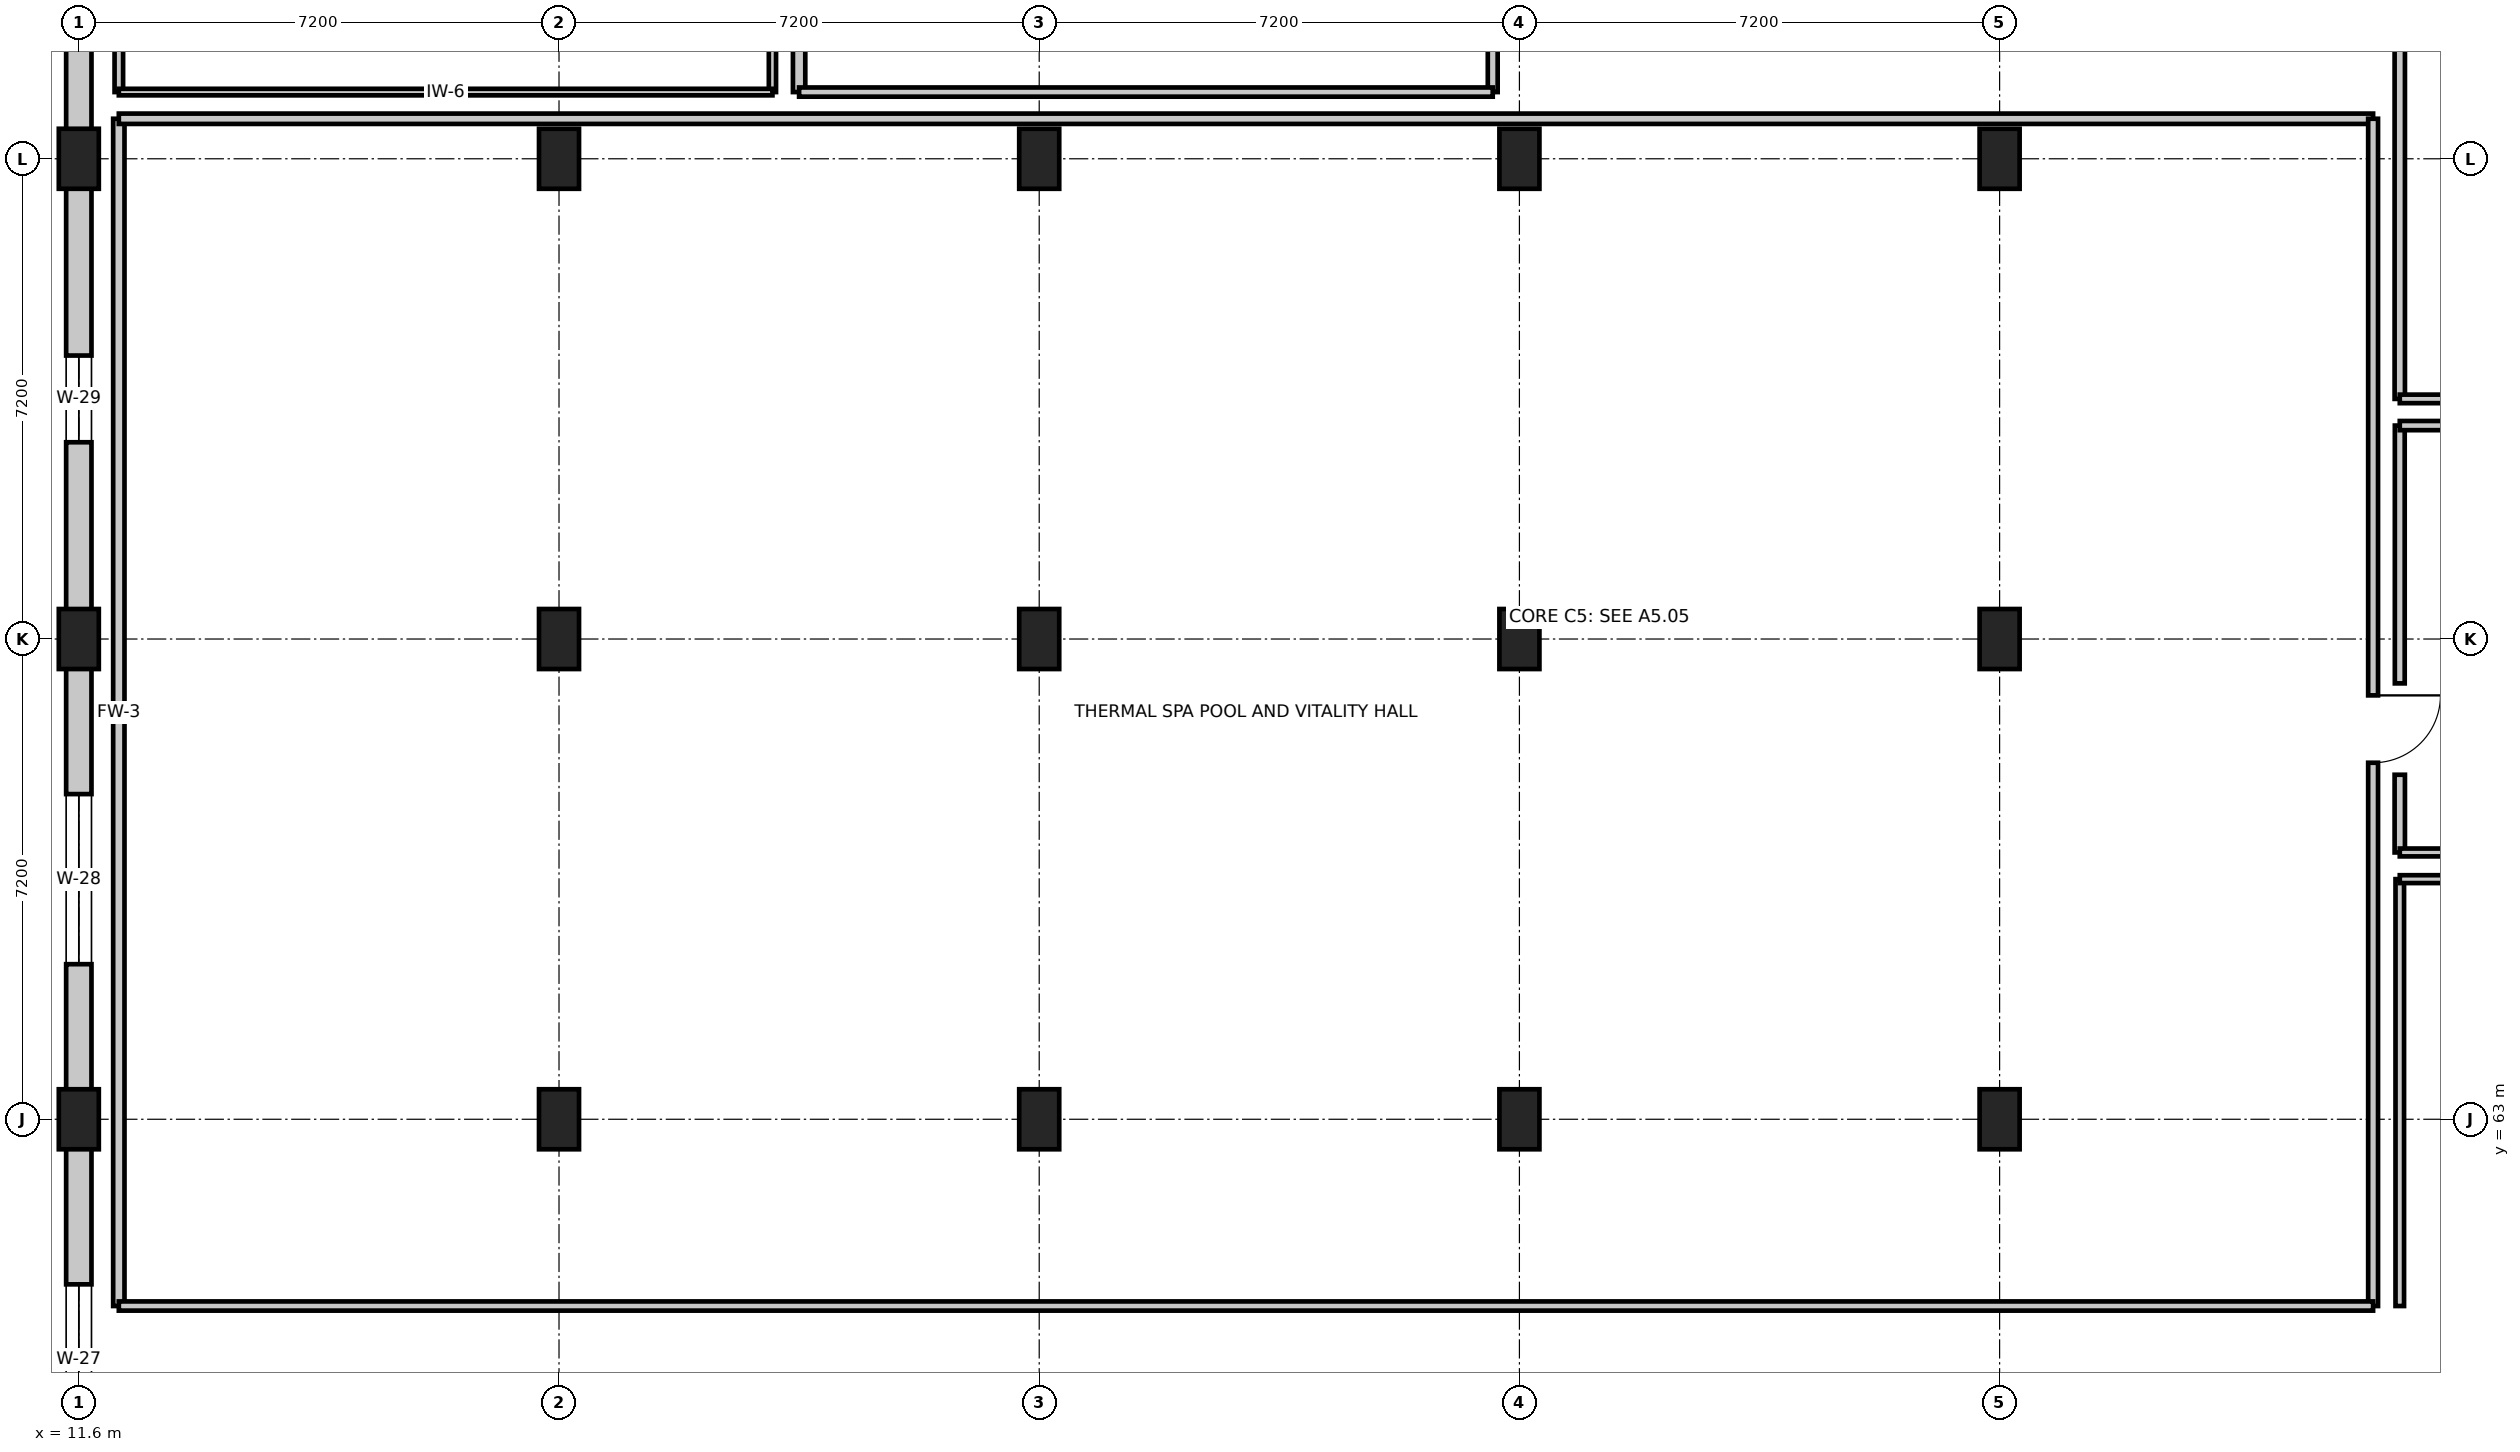
"""IFC4 building model, lengths in metres.
Left out: names, types, materials, properties, quantities, classifications, styles, units other than length and angle.
Written with IfcOpenShell. Run it as: python <this file> out.ifc"""

import sys

from ifc_helpers import new_model, si_unit, direction, frame, frame_2d, origin, origin_2d, place, context, subcontext, project, spatial, rectangle, extrude, element, fill, save


model = new_model("IFC4")
c1 = context("Model", 3, precision=1e-05, world=origin(), true_north=direction((0.0, 1.0)))
c2 = subcontext(c1, "Body", "Model", "MODEL_VIEW")
j1 = project(units=[si_unit("LENGTHUNIT", "METRE"), si_unit("PLANEANGLEUNIT", "RADIAN")], contexts=[c1])
p1 = place(None, origin())
s1 = spatial("IfcSite", under=j1, at=p1, CompositionType="ELEMENT")
p2 = place(p1, origin())
s2 = spatial("IfcBuilding", under=s1, at=p2, CompositionType="ELEMENT")
p3 = place(p2, frame((0.0, 0.0, 5.4)))
s3 = spatial("IfcBuildingStorey", under=s2, at=p3, CompositionType="ELEMENT", Elevation=5.4)
for number, where, z_axis, x_axis in (
    (1, (11.6, 63.0, 0.0), (0.0, 0.0, 1.0), (1.0, 0.0, 0.0)),
    (2, (11.6, 70.2, 0.0), (0.0, 0.0, 1.0), (1.0, 0.0, 0.0)),
    (3, (11.6, 77.4, 0.0), (0.0, 0.0, 1.0), (1.0, 0.0, 0.0)),
    (4, (18.8, 63.0, 0.0), (0.0, 0.0, 1.0), (1.0, 0.0, 0.0)),
    (5, (18.8, 70.2, 0.0), (0.0, 0.0, 1.0), (1.0, 0.0, 0.0)),
    (6, (18.8, 77.4, 0.0), (0.0, 0.0, 1.0), (1.0, 0.0, 0.0)),
    (7, (26.0, 63.0, 0.0), (0.0, 0.0, 1.0), (1.0, 0.0, 0.0)),
    (8, (26.0, 70.2, 0.0), (0.0, 0.0, 1.0), (1.0, 0.0, 0.0)),
    (9, (26.0, 77.4, 0.0), (0.0, 0.0, 1.0), (1.0, 0.0, 0.0)),
    (10, (33.2, 63.0, 0.0), (0.0, 0.0, 1.0), (1.0, 0.0, 0.0)),
    (11, (33.2, 70.2, 0.0), (0.0, 0.0, 1.0), (1.0, 0.0, 0.0)),
    (12, (33.2, 77.4, 0.0), (0.0, 0.0, 1.0), (1.0, 0.0, 0.0)),
    (13, (40.4, 63.0, 0.0), (0.0, 0.0, 1.0), (1.0, 0.0, 0.0)),
    (14, (40.4, 70.2, 0.0), (0.0, 0.0, 1.0), (1.0, 0.0, 0.0)),
    (15, (40.4, 77.4, 0.0), (0.0, 0.0, 1.0), (1.0, 0.0, 0.0)),
):
    element("IfcColumn", number, at=place(p3, frame(where, z_axis=z_axis, x_axis=x_axis)), inside=s3, PredefinedType="COLUMN", context=c2, shape_type="SweptSolid", body=[
        extrude(rectangle(XDim=0.6, YDim=0.9, at=origin_2d()), origin(), (0.0, 0.0, 1.0), 5.1),
    ])
p4 = place(p3, frame((11.6, 55.8, 0.0), z_axis=(0.0, 0.0, 1.0), x_axis=(0.0, 1.0, 0.0)))
e16 = element("IfcWall", 16, at=p4, inside=s3, PredefinedType="STANDARD", context=c2, shape_type="SweptSolid", body=[
    extrude(rectangle(XDim=7.2, YDim=0.38, at=frame_2d((3.6, 0.0))), origin(), (0.0, 0.0, 1.0), 4.305),
])
p5 = place(p4, frame((2.475, 0.0, 0.9)))
e17 = element("IfcOpeningElement", 17, at=p5, cuts=e16, PredefinedType="OPENING", context=c2, shape_type="SweptSolid", body=[
    extrude(rectangle(XDim=2.25, YDim=1.85, at=frame_2d((1.125, 0.925))), frame((0.0, 0.2, 0.0), z_axis=(0.0, -1.0, 0.0), x_axis=(1.0, 0.0, 0.0)), (0.0, 0.0, 1.0), 0.4),
])
p6 = place(p3, frame((11.6, 63.0, 0.0), z_axis=(0.0, 0.0, 1.0), x_axis=(0.0, 1.0, 0.0)))
e18 = element("IfcWall", 18, at=p6, inside=s3, PredefinedType="STANDARD", context=c2, shape_type="SweptSolid", body=[
    extrude(rectangle(XDim=7.2, YDim=0.38, at=frame_2d((3.6, 0.0))), origin(), (0.0, 0.0, 1.0), 4.407),
])
p7 = place(p6, frame((2.325, 0.0, 0.9)))
e19 = element("IfcOpeningElement", 19, at=p7, cuts=e18, PredefinedType="OPENING", context=c2, shape_type="SweptSolid", body=[
    extrude(rectangle(XDim=2.55, YDim=1.85, at=frame_2d((1.275, 0.925))), frame((0.0, 0.2, 0.0), z_axis=(0.0, -1.0, 0.0), x_axis=(1.0, 0.0, 0.0)), (0.0, 0.0, 1.0), 0.4),
])
p8 = place(p3, frame((11.6, 70.2, 0.0), z_axis=(0.0, 0.0, 1.0), x_axis=(0.0, 1.0, 0.0)))
e20 = element("IfcWall", 20, at=p8, inside=s3, PredefinedType="STANDARD", context=c2, shape_type="SweptSolid", body=[
    extrude(rectangle(XDim=7.2, YDim=0.38, at=frame_2d((3.6, 0.0))), origin(), (0.0, 0.0, 1.0), 4.407),
])
p9 = place(p8, frame((2.95, 0.0, 0.9)))
e21 = element("IfcOpeningElement", 21, at=p9, cuts=e20, PredefinedType="OPENING", context=c2, shape_type="SweptSolid", body=[
    extrude(rectangle(XDim=1.3, YDim=1.95, at=frame_2d((0.65, 0.975))), frame((0.0, 0.2, 0.0), z_axis=(0.0, -1.0, 0.0), x_axis=(1.0, 0.0, 0.0)), (0.0, 0.0, 1.0), 0.4),
])
p10 = place(p3, frame((11.6, 77.4, 0.0), z_axis=(0.0, 0.0, 1.0), x_axis=(0.0, 1.0, 0.0)))
e22 = element("IfcWall", 22, at=p10, inside=s3, PredefinedType="STANDARD", context=c2, shape_type="SweptSolid", body=[
    extrude(rectangle(XDim=7.2, YDim=0.38, at=frame_2d((3.6, 0.0))), origin(), (0.0, 0.0, 1.0), 4.407),
])
p11 = place(p10, frame((2.8, 0.0, 0.9)))
e23 = element("IfcOpeningElement", 23, at=p11, cuts=e22, PredefinedType="OPENING", context=c2, shape_type="SweptSolid", body=[
    extrude(rectangle(XDim=1.6, YDim=1.95, at=frame_2d((0.8, 0.975))), frame((0.0, 0.2, 0.0), z_axis=(0.0, -1.0, 0.0), x_axis=(1.0, 0.0, 0.0)), (0.0, 0.0, 1.0), 0.4),
])
p12 = place(p3, frame((12.2, 60.2, 0.0), z_axis=(0.0, 0.0, 1.0), x_axis=(0.0, 1.0, 0.0)))
e24 = element("IfcWall", 24, at=p12, inside=s3, PredefinedType="PARTITIONING", context=c2, shape_type="SweptSolid", body=[
    extrude(rectangle(XDim=17.8, YDim=0.17, at=frame_2d((8.9, 0.0))), origin(), (0.0, 0.0, 1.0), 4.115),
])
p13 = place(p3, frame((12.2, 78.0, 0.0), z_axis=(0.0, 0.0, 1.0), x_axis=(1.0, 0.0, 0.0)))
e25 = element("IfcWall", 25, at=p13, inside=s3, PredefinedType="PARTITIONING", context=c2, shape_type="SweptSolid", body=[
    extrude(rectangle(XDim=33.8, YDim=0.155, at=frame_2d((16.9, 0.0))), origin(), (0.0, 0.0, 1.0), 4.229),
])
p14 = place(p3, frame((46.0, 78.0, 0.0), z_axis=(0.0, 0.0, 1.0), x_axis=(0.0, -1.0, 0.0)))
e26 = element("IfcWall", 26, at=p14, inside=s3, PredefinedType="PARTITIONING", context=c2, shape_type="SweptSolid", body=[
    extrude(rectangle(XDim=17.8, YDim=0.148, at=frame_2d((8.9, 0.0))), origin(), (0.0, 0.0, 1.0), 4.115),
])
p15 = place(p14, frame((8.645, 0.0, 0.0)))
e27 = element("IfcOpeningElement", 27, at=p15, cuts=e26, PredefinedType="OPENING", context=c2, shape_type="SweptSolid", body=[
    extrude(rectangle(XDim=1.01, YDim=2.16, at=frame_2d((0.505, 1.08))), frame((0.0, 0.084, 0.0), z_axis=(0.0, -1.0, 0.0), x_axis=(1.0, 0.0, 0.0)), (0.0, 0.0, 1.0), 0.168),
])
p16 = place(p3, frame((46.0, 60.2, 0.0), z_axis=(0.0, 0.0, 1.0), x_axis=(-1.0, 0.0, 0.0)))
e28 = element("IfcWall", 28, at=p16, inside=s3, PredefinedType="PARTITIONING", context=c2, shape_type="SweptSolid", body=[
    extrude(rectangle(XDim=33.8, YDim=0.138, at=frame_2d((16.9, 0.0))), origin(), (0.0, 0.0, 1.0), 4.229),
])
p17 = place(p3, frame((12.2, 78.4, 0.0), z_axis=(0.0, 0.0, 1.0), x_axis=(0.0, 1.0, 0.0)))
e29 = element("IfcWall", 29, at=p17, inside=s3, PredefinedType="PARTITIONING", context=c2, shape_type="SweptSolid", body=[
    extrude(rectangle(XDim=8.2, YDim=0.128, at=frame_2d((4.1, 0.0))), origin(), (0.0, 0.0, 1.0), 4.115),
])
p18 = place(p3, frame((22.0, 86.6, 0.0), z_axis=(0.0, 0.0, 1.0), x_axis=(0.0, -1.0, 0.0)))
e30 = element("IfcWall", 30, at=p18, inside=s3, PredefinedType="PARTITIONING", context=c2, shape_type="SweptSolid", body=[
    extrude(rectangle(XDim=8.2, YDim=0.108, at=frame_2d((4.1, 0.0))), origin(), (0.0, 0.0, 1.0), 4.115),
])
p19 = place(p18, frame((3.575, 0.0, 0.0)))
e31 = element("IfcOpeningElement", 31, at=p19, cuts=e30, PredefinedType="OPENING", context=c2, shape_type="SweptSolid", body=[
    extrude(rectangle(XDim=1.05, YDim=2.18, at=frame_2d((0.525, 1.09))), frame((0.0, 0.064, 0.0), z_axis=(0.0, -1.0, 0.0), x_axis=(1.0, 0.0, 0.0)), (0.0, 0.0, 1.0), 0.128),
])
p20 = place(p3, frame((22.0, 78.4, 0.0), z_axis=(0.0, 0.0, 1.0), x_axis=(-1.0, 0.0, 0.0)))
e32 = element("IfcWall", 32, at=p20, inside=s3, PredefinedType="PARTITIONING", context=c2, shape_type="SweptSolid", body=[
    extrude(rectangle(XDim=9.8, YDim=0.098, at=frame_2d((4.9, 0.0))), origin(), (0.0, 0.0, 1.0), 4.229),
])
p21 = place(p3, frame((22.4, 78.4, 0.0), z_axis=(0.0, 0.0, 1.0), x_axis=(0.0, 1.0, 0.0)))
e33 = element("IfcWall", 33, at=p21, inside=s3, PredefinedType="PARTITIONING", context=c2, shape_type="SweptSolid", body=[
    extrude(rectangle(XDim=3.395, YDim=0.185, at=frame_2d((1.698, 0.0))), origin(), (0.0, 0.0, 1.0), 4.407),
])
p22 = place(p3, frame((32.8, 86.6, 0.0), z_axis=(0.0, 0.0, 1.0), x_axis=(0.0, -1.0, 0.0)))
e34 = element("IfcWall", 34, at=p22, inside=s3, PredefinedType="PARTITIONING", context=c2, shape_type="SweptSolid", body=[
    extrude(rectangle(XDim=8.2, YDim=0.148, at=frame_2d((4.1, 0.0))), origin(), (0.0, 0.0, 1.0), 4.115),
])
p23 = place(p3, frame((32.8, 78.4, 0.0), z_axis=(0.0, 0.0, 1.0), x_axis=(-1.0, 0.0, 0.0)))
e35 = element("IfcWall", 35, at=p23, inside=s3, PredefinedType="PARTITIONING", context=c2, shape_type="SweptSolid", body=[
    extrude(rectangle(XDim=10.4, YDim=0.138, at=frame_2d((5.2, 0.0))), origin(), (0.0, 0.0, 1.0), 4.229),
])
p24 = place(p3, frame((46.4, 60.2, 0.0), z_axis=(0.0, 0.0, 1.0), x_axis=(0.0, 1.0, 0.0)))
e36 = element("IfcWall", 36, at=p24, inside=s3, PredefinedType="PARTITIONING", context=c2, shape_type="SweptSolid", body=[
    extrude(rectangle(XDim=6.4, YDim=0.128, at=frame_2d((3.2, 0.0))), origin(), (0.0, 0.0, 1.0), 4.115),
])
p25 = place(p3, frame((46.4, 66.6, 0.0), z_axis=(0.0, 0.0, 1.0), x_axis=(1.0, 0.0, 0.0)))
e37 = element("IfcWall", 37, at=p25, inside=s3, PredefinedType="PARTITIONING", context=c2, shape_type="SweptSolid", body=[
    extrude(rectangle(XDim=7.2, YDim=0.118, at=frame_2d((3.6, 0.0))), origin(), (0.0, 0.0, 1.0), 4.229),
])
p26 = place(p3, frame((46.4, 67.0, 0.0), z_axis=(0.0, 0.0, 1.0), x_axis=(0.0, 1.0, 0.0)))
e38 = element("IfcWall", 38, at=p26, inside=s3, PredefinedType="PARTITIONING", context=c2, shape_type="SweptSolid", body=[
    extrude(rectangle(XDim=1.165, YDim=0.155, at=frame_2d((0.583, 0.0))), origin(), (0.0, 0.0, 1.0), 4.78),
])
p27 = place(p3, frame((46.4, 69.535, 0.0), z_axis=(0.0, 0.0, 1.0), x_axis=(0.0, 1.0, 0.0)))
e39 = element("IfcWall", 39, at=p27, inside=s3, PredefinedType="PARTITIONING", context=c2, shape_type="SweptSolid", body=[
    extrude(rectangle(XDim=3.865, YDim=0.148, at=frame_2d((1.933, 0.0))), origin(), (0.0, 0.0, 1.0), 4.115),
])
p28 = place(p3, frame((46.4, 73.4, 0.0), z_axis=(0.0, 0.0, 1.0), x_axis=(1.0, 0.0, 0.0)))
e40 = element("IfcWall", 40, at=p28, inside=s3, PredefinedType="PARTITIONING", context=c2, shape_type="SweptSolid", body=[
    extrude(rectangle(XDim=7.2, YDim=0.138, at=frame_2d((3.6, 0.0))), origin(), (0.0, 0.0, 1.0), 4.229),
])
p29 = place(p3, frame((53.6, 67.0, 0.0), z_axis=(0.0, 0.0, 1.0), x_axis=(-1.0, 0.0, 0.0)))
e41 = element("IfcWall", 41, at=p29, inside=s3, PredefinedType="PARTITIONING", context=c2, shape_type="SweptSolid", body=[
    extrude(rectangle(XDim=7.2, YDim=0.118, at=frame_2d((3.6, 0.0))), origin(), (0.0, 0.0, 1.0), 4.229),
])
p30 = place(p3, frame((46.4, 73.8, 0.0), z_axis=(0.0, 0.0, 1.0), x_axis=(0.0, 1.0, 0.0)))
e42 = element("IfcWall", 42, at=p30, inside=s3, PredefinedType="PARTITIONING", context=c2, shape_type="SweptSolid", body=[
    extrude(rectangle(XDim=6.4, YDim=0.155, at=frame_2d((3.2, 0.0))), origin(), (0.0, 0.0, 1.0), 4.115),
])
p31 = place(p3, frame((53.6, 73.8, 0.0), z_axis=(0.0, 0.0, 1.0), x_axis=(-1.0, 0.0, 0.0)))
e43 = element("IfcWall", 43, at=p31, inside=s3, PredefinedType="PARTITIONING", context=c2, shape_type="SweptSolid", body=[
    extrude(rectangle(XDim=7.2, YDim=0.128, at=frame_2d((3.6, 0.0))), origin(), (0.0, 0.0, 1.0), 4.229),
])
p32 = place(p5, origin())
e44 = element("IfcWindow", 44, at=p32, inside=s3, PartitioningType="SINGLE_PANEL", PredefinedType="WINDOW", context=c2, shape_type="SweptSolid", body=[
    extrude(rectangle(XDim=2.25, YDim=1.85, at=frame_2d((1.125, 0.925))), frame((0.0, 0.03, 0.0), z_axis=(0.0, -1.0, 0.0), x_axis=(1.0, 0.0, 0.0)), (0.0, 0.0, 1.0), 0.06),
])
fill(e17, e44)
p33 = place(p7, origin())
e45 = element("IfcWindow", 45, at=p33, inside=s3, PartitioningType="SINGLE_PANEL", PredefinedType="WINDOW", context=c2, shape_type="SweptSolid", body=[
    extrude(rectangle(XDim=2.55, YDim=1.85, at=frame_2d((1.275, 0.925))), frame((0.0, 0.03, 0.0), z_axis=(0.0, -1.0, 0.0), x_axis=(1.0, 0.0, 0.0)), (0.0, 0.0, 1.0), 0.06),
])
fill(e19, e45)
p34 = place(p9, origin())
e46 = element("IfcWindow", 46, at=p34, inside=s3, PartitioningType="SINGLE_PANEL", PredefinedType="WINDOW", context=c2, shape_type="SweptSolid", body=[
    extrude(rectangle(XDim=1.3, YDim=1.95, at=frame_2d((0.65, 0.975))), frame((0.0, 0.03, 0.0), z_axis=(0.0, -1.0, 0.0), x_axis=(1.0, 0.0, 0.0)), (0.0, 0.0, 1.0), 0.06),
])
fill(e21, e46)
p35 = place(p15, origin())
e47 = element("IfcDoor", 47, at=p35, inside=s3, OperationType="SINGLE_SWING_LEFT", PredefinedType="DOOR", context=c2, shape_type="SweptSolid", body=[
    extrude(rectangle(XDim=1.01, YDim=2.16, at=frame_2d((0.505, 1.08))), frame((0.0, 0.025, 0.0), z_axis=(0.0, -1.0, 0.0), x_axis=(1.0, 0.0, 0.0)), (0.0, 0.0, 1.0), 0.05),
])
fill(e27, e47)
save(model, sys.argv[1])
